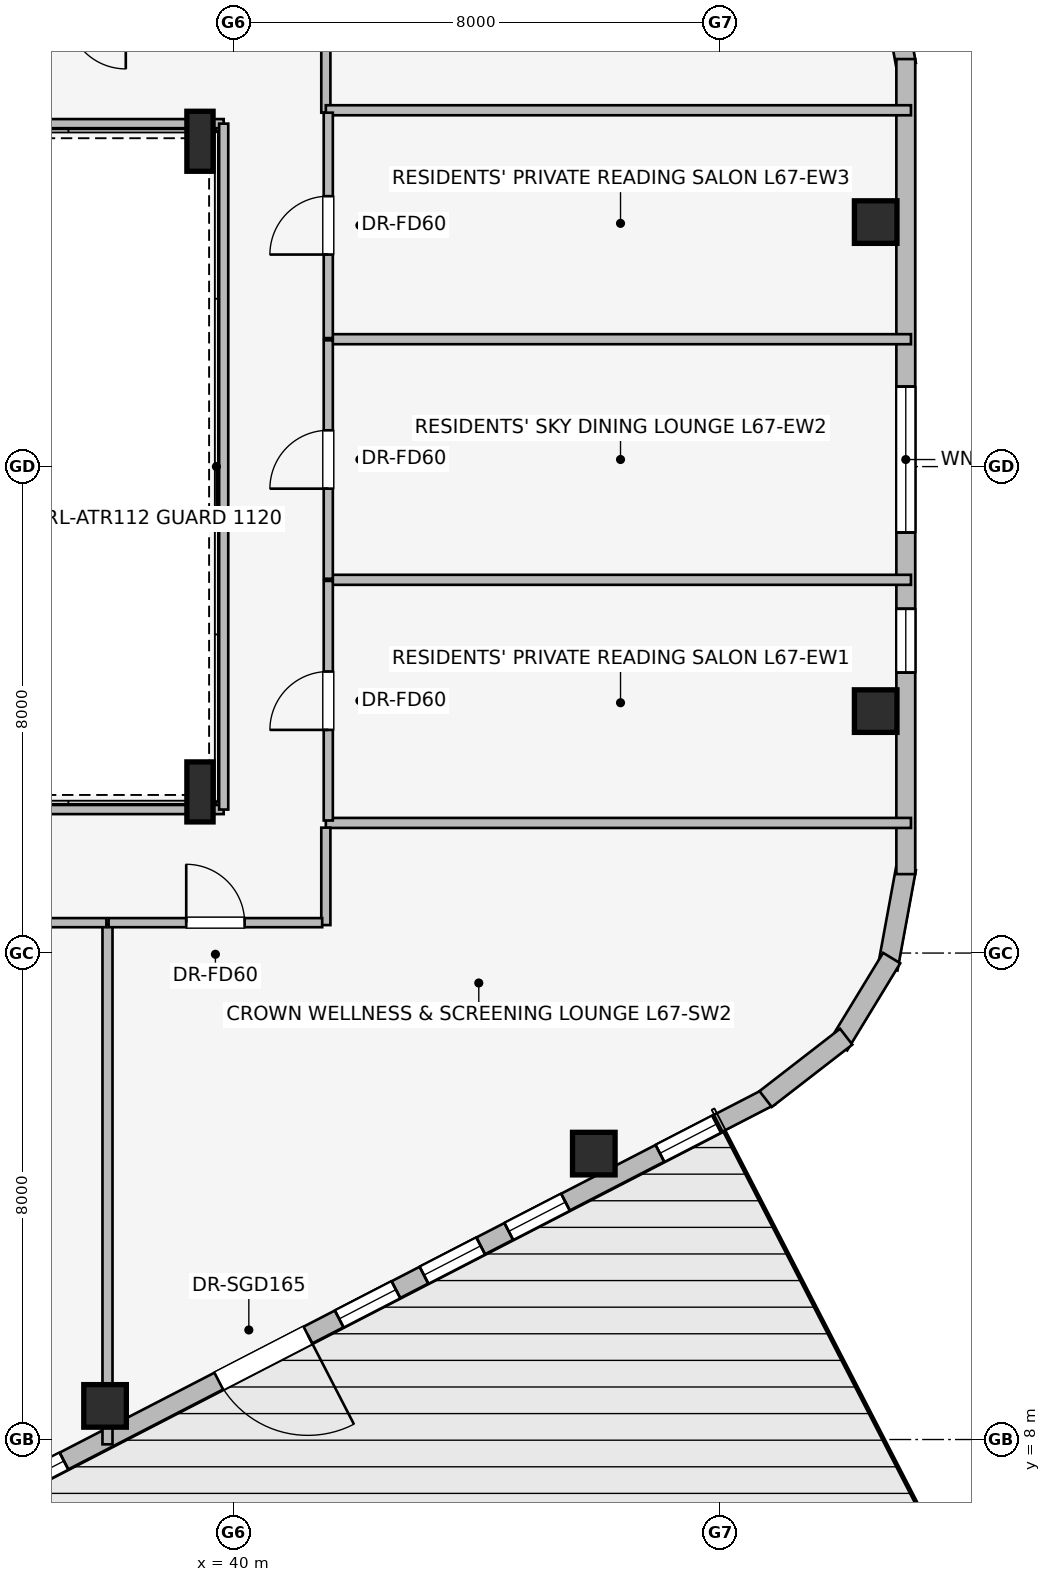
"""IFC4 building model, lengths in metres.
Left out: names, types, materials, properties, quantities, classifications, styles, units other than length and angle.
Written with IfcOpenShell. Run it as: python <this file> out.ifc"""

import sys

from ifc_helpers import new_model, si_unit, direction, frame, frame_2d, origin, origin_2d, place, context, subcontext, project, spatial, rectangle, i_section, extrude, element, fill, save


model = new_model("IFC4")
c1 = context("Model", 3, precision=1e-05, world=origin(), true_north=direction((0.0, 1.0)))
c2 = subcontext(c1, "Body", "Model", "MODEL_VIEW")
j1 = project(units=[si_unit("LENGTHUNIT", "METRE"), si_unit("PLANEANGLEUNIT", "RADIAN")], contexts=[c1])
p1 = place(None, origin())
s1 = spatial("IfcSite", under=j1, at=p1, CompositionType="ELEMENT")
p2 = place(p1, origin())
s2 = spatial("IfcBuilding", under=s1, at=p2, CompositionType="ELEMENT")
p3 = place(p2, frame((0.0, 0.0, 245.45)))
s3 = spatial("IfcBuildingStorey", under=s2, at=p3, CompositionType="ELEMENT", Elevation=245.45)
for number, where, z_axis, x_axis in (
    (1, (37.889, 8.553, 0.0), (0.0, 0.0, 1.0), (1.0, 0.0, 0.0)),
    (2, (45.927, 12.702, 0.0), (0.0, 0.0, 1.0), (1.0, 0.0, 0.0)),
    (3, (50.563, 19.979, 0.0), (0.0, 0.0, 1.0), (1.0, 0.0, 0.0)),
    (4, (50.563, 28.021, 0.0), (0.0, 0.0, 1.0), (1.0, 0.0, 0.0)),
):
    element("IfcColumn", number, at=place(p3, frame(where, z_axis=z_axis, x_axis=x_axis)), inside=s3, PredefinedType="COLUMN", context=c2, shape_type="SweptSolid", body=[
        extrude(rectangle(XDim=0.7, YDim=0.7, at=origin_2d()), origin(), (0.0, 0.0, 1.0), 3.55),
    ])
for number, where, z_axis, x_axis in (
    (5, (39.45, 18.65, 0.0), (0.0, 0.0, 1.0), (1.0, 0.0, 0.0)),
    (6, (39.45, 29.35, 0.0), (0.0, 0.0, 1.0), (1.0, 0.0, 0.0)),
):
    element("IfcColumn", number, at=place(p3, frame(where, z_axis=z_axis, x_axis=x_axis)), inside=s3, PredefinedType="COLUMN", context=c2, shape_type="SweptSolid", body=[
        extrude(i_section(OverallWidth=0.431, OverallDepth=0.987, WebThickness=0.034, FlangeThickness=0.062, at=origin_2d()), origin(), (0.0, 0.0, 1.0), 3.55),
    ])
p4 = place(p3, frame((50.759, 32.257, 0.0), z_axis=(0.0, 0.0, 1.0), x_axis=(0.180691763044, -0.983539773862, 0.0)))
e7 = element("IfcWall", 7, at=p4, inside=s3, PredefinedType="STANDARD", context=c2, shape_type="SweptSolid", body=[
    extrude(rectangle(XDim=1.677, YDim=0.33, at=frame_2d((0.838, 0.0))), origin(), (0.0, 0.0, 1.0), 3.29),
])
p5 = place(p3, frame((48.834, 13.646, 0.0), z_axis=(0.0, 0.0, 1.0), x_axis=(-0.888581481622, -0.458718814218, 0.0)))
e8 = element("IfcWall", 8, at=p5, inside=s3, PredefinedType="STANDARD", context=c2, shape_type="SweptSolid", body=[
    extrude(rectangle(XDim=15.077, YDim=0.31, at=frame_2d((7.539, 0.0))), origin(), (0.0, 0.0, 1.0), 3.29),
])
p6 = place(p5, frame((8.563, 0.0, 0.0)))
e9 = element("IfcOpeningElement", 9, at=p6, cuts=e8, PredefinedType="OPENING", context=c2, shape_type="SweptSolid", body=[
    extrude(rectangle(XDim=1.65, YDim=2.25, at=frame_2d((0.825, 1.125))), frame((0.0, 0.165, 0.0), z_axis=(0.0, -1.0, 0.0), x_axis=(1.0, 0.0, 0.0)), (0.0, 0.0, 1.0), 0.33),
])
p7 = place(p5, frame((0.998, 0.0, 0.75)))
e10 = element("IfcOpeningElement", 10, at=p7, cuts=e8, PredefinedType="OPENING", context=c2, shape_type="SweptSolid", body=[
    extrude(rectangle(XDim=1.05, YDim=1.4, at=frame_2d((0.525, 0.7))), frame((0.0, 0.165, 0.0), z_axis=(0.0, -1.0, 0.0), x_axis=(1.0, 0.0, 0.0)), (0.0, 0.0, 1.0), 0.33),
])
p8 = place(p5, frame((3.796, 0.0, 0.75)))
e11 = element("IfcOpeningElement", 11, at=p8, cuts=e8, PredefinedType="OPENING", context=c2, shape_type="SweptSolid", body=[
    extrude(rectangle(XDim=1.05, YDim=1.4, at=frame_2d((0.525, 0.7))), frame((0.0, 0.165, 0.0), z_axis=(0.0, -1.0, 0.0), x_axis=(1.0, 0.0, 0.0)), (0.0, 0.0, 1.0), 0.33),
])
p9 = place(p5, frame((5.365, 0.0, 0.75)))
e12 = element("IfcOpeningElement", 12, at=p9, cuts=e8, PredefinedType="OPENING", context=c2, shape_type="SweptSolid", body=[
    extrude(rectangle(XDim=1.05, YDim=1.4, at=frame_2d((0.525, 0.7))), frame((0.0, 0.165, 0.0), z_axis=(0.0, -1.0, 0.0), x_axis=(1.0, 0.0, 0.0)), (0.0, 0.0, 1.0), 0.33),
])
p10 = place(p5, frame((6.934, 0.0, 0.75)))
e13 = element("IfcOpeningElement", 13, at=p10, cuts=e8, PredefinedType="OPENING", context=c2, shape_type="SweptSolid", body=[
    extrude(rectangle(XDim=1.05, YDim=1.4, at=frame_2d((0.525, 0.7))), frame((0.0, 0.165, 0.0), z_axis=(0.0, -1.0, 0.0), x_axis=(1.0, 0.0, 0.0)), (0.0, 0.0, 1.0), 0.33),
])
p11 = place(p5, frame((13.078, 0.0, 0.75)))
e14 = element("IfcOpeningElement", 14, at=p11, cuts=e8, PredefinedType="OPENING", context=c2, shape_type="SweptSolid", body=[
    extrude(rectangle(XDim=1.05, YDim=1.4, at=frame_2d((0.525, 0.7))), frame((0.0, 0.165, 0.0), z_axis=(0.0, -1.0, 0.0), x_axis=(1.0, 0.0, 0.0)), (0.0, 0.0, 1.0), 0.33),
])
p12 = place(p3, frame((51.062, 17.392, 0.0), z_axis=(0.0, 0.0, 1.0), x_axis=(-0.180691763044, -0.983539773862, 0.0)))
e15 = element("IfcWall", 15, at=p12, inside=s3, PredefinedType="STANDARD", context=c2, shape_type="SweptSolid", body=[
    extrude(rectangle(XDim=1.677, YDim=0.33, at=frame_2d((0.838, 0.0))), origin(), (0.0, 0.0, 1.0), 3.29),
])
p13 = place(p3, frame((50.826, 15.918, 0.0), z_axis=(0.0, 0.0, 1.0), x_axis=(-0.520325409202, -0.853968072318, 0.0)))
e16 = element("IfcWall", 16, at=p13, inside=s3, PredefinedType="STANDARD", context=c2, shape_type="SweptSolid", body=[
    extrude(rectangle(XDim=1.678, YDim=0.33, at=frame_2d((0.839, 0.0))), origin(), (0.0, 0.0, 1.0), 3.29),
])
p14 = place(p3, frame((50.078, 14.625, 0.0), z_axis=(0.0, 0.0, 1.0), x_axis=(-0.790691856293, -0.61221433207, 0.0)))
e17 = element("IfcWall", 17, at=p14, inside=s3, PredefinedType="STANDARD", context=c2, shape_type="SweptSolid", body=[
    extrude(rectangle(XDim=1.676, YDim=0.33, at=frame_2d((0.838, 0.0))), origin(), (0.0, 0.0, 1.0), 3.29),
])
p15 = place(p3, frame((51.058, 30.702, 0.0), z_axis=(0.0, 0.0, 1.0), x_axis=(0.0, -1.0, 0.0)))
e18 = element("IfcWall", 18, at=p15, inside=s3, PredefinedType="STANDARD", context=c2, shape_type="SweptSolid", body=[
    extrude(rectangle(XDim=13.404, YDim=0.31, at=frame_2d((6.702, 0.0))), origin(), (0.0, 0.0, 1.0), 3.29),
])
p16 = place(p15, frame((5.386, 0.0, 0.75)))
e19 = element("IfcOpeningElement", 19, at=p16, cuts=e18, PredefinedType="OPENING", context=c2, shape_type="SweptSolid", body=[
    extrude(rectangle(XDim=2.4, YDim=1.6, at=frame_2d((1.2, 0.8))), frame((0.0, 0.165, 0.0), z_axis=(0.0, -1.0, 0.0), x_axis=(1.0, 0.0, 0.0)), (0.0, 0.0, 1.0), 0.33),
])
p17 = place(p15, frame((9.04, 0.0, 0.75)))
e20 = element("IfcOpeningElement", 20, at=p17, cuts=e18, PredefinedType="OPENING", context=c2, shape_type="SweptSolid", body=[
    extrude(rectangle(XDim=1.05, YDim=1.4, at=frame_2d((0.525, 0.7))), frame((0.0, 0.165, 0.0), z_axis=(0.0, -1.0, 0.0), x_axis=(1.0, 0.0, 0.0)), (0.0, 0.0, 1.0), 0.33),
])
p18 = place(p3, frame((27.675, 18.36, 0.0), z_axis=(0.0, 0.0, 1.0), x_axis=(1.0, 0.0, 0.0)))
e21 = element("IfcWall", 21, at=p18, inside=s3, PredefinedType="PARTITIONING", context=c2, shape_type="SweptSolid", body=[
    extrude(rectangle(XDim=12.165, YDim=0.15, at=frame_2d((6.083, 0.0))), origin(), (0.0, 0.0, 1.0), 2.431),
])
p19 = place(p3, frame((39.84, 29.64, 0.0), z_axis=(0.0, 0.0, 1.0), x_axis=(-1.0, 0.0, 0.0)))
e22 = element("IfcWall", 22, at=p19, inside=s3, PredefinedType="PARTITIONING", context=c2, shape_type="SweptSolid", body=[
    extrude(rectangle(XDim=12.203, YDim=0.15, at=frame_2d((6.102, 0.0))), origin(), (0.0, 0.0, 1.0), 2.431),
])
p20 = place(p3, frame((39.84, 18.36, 0.0), z_axis=(0.0, 0.0, 1.0), x_axis=(0.0, 1.0, 0.0)))
e23 = element("IfcWall", 23, at=p20, inside=s3, PredefinedType="PARTITIONING", context=c2, shape_type="SweptSolid", body=[
    extrude(rectangle(XDim=11.28, YDim=0.15, at=frame_2d((5.64, 0.0))), origin(), (0.0, 0.0, 1.0), 3.29),
])
p21 = place(p3, frame((41.52, 29.82, 0.0), z_axis=(0.0, 0.0, 1.0), x_axis=(0.0, 1.0, 0.0)))
e24 = element("IfcWall", 24, at=p21, inside=s3, PredefinedType="PARTITIONING", context=c2, shape_type="SweptSolid", body=[
    extrude(rectangle(XDim=1.72, YDim=0.15, at=frame_2d((0.86, 0.0))), origin(), (0.0, 0.0, 1.0), 3.29),
])
for number, where, z_axis, x_axis in (
    (25, (41.52, 18.14, 0.0), (0.0, 0.0, 1.0), (1.0, 0.0, 0.0)),
    (26, (41.52, 29.86, 0.0), (0.0, 0.0, 1.0), (1.0, 0.0, 0.0)),
):
    element("IfcWall", number, at=place(p3, frame(where, z_axis=z_axis, x_axis=x_axis)), inside=s3, PredefinedType="PARTITIONING", context=c2, shape_type="SweptSolid", body=[
        extrude(rectangle(XDim=9.623, YDim=0.165, at=frame_2d((4.812, 0.0))), origin(), (0.0, 0.0, 1.0), 3.29),
    ])
for number, where, z_axis, x_axis in (
    (27, (41.59, 22.138, 0.0), (0.0, 0.0, 1.0), (1.0, 0.0, 0.0)),
    (28, (41.59, 26.095, 0.0), (0.0, 0.0, 1.0), (1.0, 0.0, 0.0)),
):
    element("IfcWall", number, at=place(p3, frame(where, z_axis=z_axis, x_axis=x_axis)), inside=s3, PredefinedType="PARTITIONING", context=c2, shape_type="SweptSolid", body=[
        extrude(rectangle(XDim=9.553, YDim=0.165, at=frame_2d((4.776, 0.0))), origin(), (0.0, 0.0, 1.0), 3.29),
    ])
p22 = place(p3, frame((41.56, 18.18, 0.0), z_axis=(0.0, 0.0, 1.0), x_axis=(0.0, 1.0, 0.0)))
e29 = element("IfcWall", 29, at=p22, inside=s3, PredefinedType="PARTITIONING", context=c2, shape_type="SweptSolid", body=[
    extrude(rectangle(XDim=3.94, YDim=0.15, at=frame_2d((1.97, 0.0))), origin(), (0.0, 0.0, 1.0), 3.29),
])
p23 = place(p22, frame((1.49, 0.0, 0.0)))
e30 = element("IfcOpeningElement", 30, at=p23, cuts=e29, PredefinedType="OPENING", context=c2, shape_type="SweptSolid", body=[
    extrude(rectangle(XDim=0.96, YDim=2.0, at=frame_2d((0.48, 1.0))), frame((0.0, 0.085, 0.0), z_axis=(0.0, -1.0, 0.0), x_axis=(1.0, 0.0, 0.0)), (0.0, 0.0, 1.0), 0.17),
])
p24 = place(p3, frame((41.56, 22.156, 0.0), z_axis=(0.0, 0.0, 1.0), x_axis=(0.0, 1.0, 0.0)))
e31 = element("IfcWall", 31, at=p24, inside=s3, PredefinedType="PARTITIONING", context=c2, shape_type="SweptSolid", body=[
    extrude(rectangle(XDim=3.921, YDim=0.15, at=frame_2d((1.96, 0.0))), origin(), (0.0, 0.0, 1.0), 3.29),
])
p25 = place(p24, frame((1.481, 0.0, 0.0)))
e32 = element("IfcOpeningElement", 32, at=p25, cuts=e31, PredefinedType="OPENING", context=c2, shape_type="SweptSolid", body=[
    extrude(rectangle(XDim=0.96, YDim=2.0, at=frame_2d((0.48, 1.0))), frame((0.0, 0.085, 0.0), z_axis=(0.0, -1.0, 0.0), x_axis=(1.0, 0.0, 0.0)), (0.0, 0.0, 1.0), 0.17),
])
p26 = place(p3, frame((41.56, 26.113, 0.0), z_axis=(0.0, 0.0, 1.0), x_axis=(0.0, 1.0, 0.0)))
e33 = element("IfcWall", 33, at=p26, inside=s3, PredefinedType="PARTITIONING", context=c2, shape_type="SweptSolid", body=[
    extrude(rectangle(XDim=3.707, YDim=0.15, at=frame_2d((1.854, 0.0))), origin(), (0.0, 0.0, 1.0), 3.29),
])
p27 = place(p26, frame((1.374, 0.0, 0.0)))
e34 = element("IfcOpeningElement", 34, at=p27, cuts=e33, PredefinedType="OPENING", context=c2, shape_type="SweptSolid", body=[
    extrude(rectangle(XDim=0.96, YDim=2.0, at=frame_2d((0.48, 1.0))), frame((0.0, 0.085, 0.0), z_axis=(0.0, -1.0, 0.0), x_axis=(1.0, 0.0, 0.0)), (0.0, 0.0, 1.0), 0.17),
])
p28 = place(p3, frame((41.52, 16.46, 0.0), z_axis=(0.0, 0.0, 1.0), x_axis=(0.0, 1.0, 0.0)))
e35 = element("IfcWall", 35, at=p28, inside=s3, PredefinedType="PARTITIONING", context=c2, shape_type="SweptSolid", body=[
    extrude(rectangle(XDim=1.602, YDim=0.15, at=frame_2d((0.801, 0.0))), origin(), (0.0, 0.0, 1.0), 3.29),
])
p29 = place(p3, frame((37.929, 7.921, 0.0), z_axis=(0.0, 0.0, 1.0), x_axis=(0.0, 1.0, 0.0)))
e36 = element("IfcWall", 36, at=p29, inside=s3, PredefinedType="PARTITIONING", context=c2, shape_type="SweptSolid", body=[
    extrude(rectangle(XDim=8.549, YDim=0.165, at=frame_2d((4.274, 0.0))), origin(), (0.0, 0.0, 1.0), 2.679),
])
p30 = place(p3, frame((32.85, 16.5, 0.0), z_axis=(0.0, 0.0, 1.0), x_axis=(1.0, 0.0, 0.0)))
e37 = element("IfcWall", 37, at=p30, inside=s3, PredefinedType="PARTITIONING", context=c2, shape_type="SweptSolid", body=[
    extrude(rectangle(XDim=5.061, YDim=0.15, at=frame_2d((2.53, 0.0))), origin(), (0.0, 0.0, 1.0), 3.29),
])
p31 = place(p30, frame((2.051, 0.0, 0.0)))
e38 = element("IfcOpeningElement", 38, at=p31, cuts=e37, PredefinedType="OPENING", context=c2, shape_type="SweptSolid", body=[
    extrude(rectangle(XDim=0.96, YDim=2.0, at=frame_2d((0.48, 1.0))), frame((0.0, 0.085, 0.0), z_axis=(0.0, -1.0, 0.0), x_axis=(1.0, 0.0, 0.0)), (0.0, 0.0, 1.0), 0.17),
])
p32 = place(p3, frame((37.947, 16.5, 0.0), z_axis=(0.0, 0.0, 1.0), x_axis=(1.0, 0.0, 0.0)))
e39 = element("IfcWall", 39, at=p32, inside=s3, PredefinedType="PARTITIONING", context=c2, shape_type="SweptSolid", body=[
    extrude(rectangle(XDim=3.513, YDim=0.15, at=frame_2d((1.756, 0.0))), origin(), (0.0, 0.0, 1.0), 3.29),
])
p33 = place(p32, frame((1.277, 0.0, 0.0)))
e40 = element("IfcOpeningElement", 40, at=p33, cuts=e39, PredefinedType="OPENING", context=c2, shape_type="SweptSolid", body=[
    extrude(rectangle(XDim=0.96, YDim=2.0, at=frame_2d((0.48, 1.0))), frame((0.0, 0.085, 0.0), z_axis=(0.0, -1.0, 0.0), x_axis=(1.0, 0.0, 0.0)), (0.0, 0.0, 1.0), 0.17),
])
p34 = place(p6, origin())
e41 = element("IfcDoor", 41, at=p34, inside=s3, OperationType="SINGLE_SWING_LEFT", PredefinedType="DOOR", context=c2, shape_type="SweptSolid", body=[
    extrude(rectangle(XDim=1.65, YDim=2.25, at=frame_2d((0.825, 1.125))), frame((0.0, 0.025, 0.0), z_axis=(0.0, -1.0, 0.0), x_axis=(1.0, 0.0, 0.0)), (0.0, 0.0, 1.0), 0.05),
])
fill(e9, e41)
p35 = place(p7, origin())
e42 = element("IfcWindow", 42, at=p35, inside=s3, PartitioningType="SINGLE_PANEL", PredefinedType="WINDOW", context=c2, shape_type="SweptSolid", body=[
    extrude(rectangle(XDim=1.05, YDim=1.4, at=frame_2d((0.525, 0.7))), frame((0.0, 0.03, 0.0), z_axis=(0.0, -1.0, 0.0), x_axis=(1.0, 0.0, 0.0)), (0.0, 0.0, 1.0), 0.06),
])
fill(e10, e42)
p36 = place(p8, origin())
e43 = element("IfcWindow", 43, at=p36, inside=s3, PartitioningType="SINGLE_PANEL", PredefinedType="WINDOW", context=c2, shape_type="SweptSolid", body=[
    extrude(rectangle(XDim=1.05, YDim=1.4, at=frame_2d((0.525, 0.7))), frame((0.0, 0.03, 0.0), z_axis=(0.0, -1.0, 0.0), x_axis=(1.0, 0.0, 0.0)), (0.0, 0.0, 1.0), 0.06),
])
fill(e11, e43)
p37 = place(p9, origin())
e44 = element("IfcWindow", 44, at=p37, inside=s3, PartitioningType="SINGLE_PANEL", PredefinedType="WINDOW", context=c2, shape_type="SweptSolid", body=[
    extrude(rectangle(XDim=1.05, YDim=1.4, at=frame_2d((0.525, 0.7))), frame((0.0, 0.03, 0.0), z_axis=(0.0, -1.0, 0.0), x_axis=(1.0, 0.0, 0.0)), (0.0, 0.0, 1.0), 0.06),
])
fill(e12, e44)
p38 = place(p10, origin())
e45 = element("IfcWindow", 45, at=p38, inside=s3, PartitioningType="SINGLE_PANEL", PredefinedType="WINDOW", context=c2, shape_type="SweptSolid", body=[
    extrude(rectangle(XDim=1.05, YDim=1.4, at=frame_2d((0.525, 0.7))), frame((0.0, 0.03, 0.0), z_axis=(0.0, -1.0, 0.0), x_axis=(1.0, 0.0, 0.0)), (0.0, 0.0, 1.0), 0.06),
])
fill(e13, e45)
p39 = place(p11, origin())
e46 = element("IfcWindow", 46, at=p39, inside=s3, PartitioningType="SINGLE_PANEL", PredefinedType="WINDOW", context=c2, shape_type="SweptSolid", body=[
    extrude(rectangle(XDim=1.05, YDim=1.4, at=frame_2d((0.525, 0.7))), frame((0.0, 0.03, 0.0), z_axis=(0.0, -1.0, 0.0), x_axis=(1.0, 0.0, 0.0)), (0.0, 0.0, 1.0), 0.06),
])
fill(e14, e46)
p40 = place(p16, origin())
e47 = element("IfcWindow", 47, at=p40, inside=s3, PartitioningType="SINGLE_PANEL", PredefinedType="WINDOW", context=c2, shape_type="SweptSolid", body=[
    extrude(rectangle(XDim=2.4, YDim=1.6, at=frame_2d((1.2, 0.8))), frame((0.0, 0.03, 0.0), z_axis=(0.0, -1.0, 0.0), x_axis=(1.0, 0.0, 0.0)), (0.0, 0.0, 1.0), 0.06),
])
fill(e19, e47)
p41 = place(p17, origin())
e48 = element("IfcWindow", 48, at=p41, inside=s3, PartitioningType="SINGLE_PANEL", PredefinedType="WINDOW", context=c2, shape_type="SweptSolid", body=[
    extrude(rectangle(XDim=1.05, YDim=1.4, at=frame_2d((0.525, 0.7))), frame((0.0, 0.03, 0.0), z_axis=(0.0, -1.0, 0.0), x_axis=(1.0, 0.0, 0.0)), (0.0, 0.0, 1.0), 0.06),
])
fill(e20, e48)
p42 = place(p23, origin())
e49 = element("IfcDoor", 49, at=p42, inside=s3, OperationType="SINGLE_SWING_LEFT", PredefinedType="DOOR", context=c2, shape_type="SweptSolid", body=[
    extrude(rectangle(XDim=0.96, YDim=2.0, at=frame_2d((0.48, 1.0))), frame((0.0, 0.025, 0.0), z_axis=(0.0, -1.0, 0.0), x_axis=(1.0, 0.0, 0.0)), (0.0, 0.0, 1.0), 0.05),
])
fill(e30, e49)
p43 = place(p25, origin())
e50 = element("IfcDoor", 50, at=p43, inside=s3, OperationType="SINGLE_SWING_LEFT", PredefinedType="DOOR", context=c2, shape_type="SweptSolid", body=[
    extrude(rectangle(XDim=0.96, YDim=2.0, at=frame_2d((0.48, 1.0))), frame((0.0, 0.025, 0.0), z_axis=(0.0, -1.0, 0.0), x_axis=(1.0, 0.0, 0.0)), (0.0, 0.0, 1.0), 0.05),
])
fill(e32, e50)
p44 = place(p27, origin())
e51 = element("IfcDoor", 51, at=p44, inside=s3, OperationType="SINGLE_SWING_LEFT", PredefinedType="DOOR", context=c2, shape_type="SweptSolid", body=[
    extrude(rectangle(XDim=0.96, YDim=2.0, at=frame_2d((0.48, 1.0))), frame((0.0, 0.025, 0.0), z_axis=(0.0, -1.0, 0.0), x_axis=(1.0, 0.0, 0.0)), (0.0, 0.0, 1.0), 0.05),
])
fill(e34, e51)
p45 = place(p33, origin())
e52 = element("IfcDoor", 52, at=p45, inside=s3, OperationType="SINGLE_SWING_LEFT", PredefinedType="DOOR", context=c2, shape_type="SweptSolid", body=[
    extrude(rectangle(XDim=0.96, YDim=2.0, at=frame_2d((0.48, 1.0))), frame((0.0, 0.025, 0.0), z_axis=(0.0, -1.0, 0.0), x_axis=(1.0, 0.0, 0.0)), (0.0, 0.0, 1.0), 0.05),
])
fill(e40, e52)
save(model, sys.argv[1])
